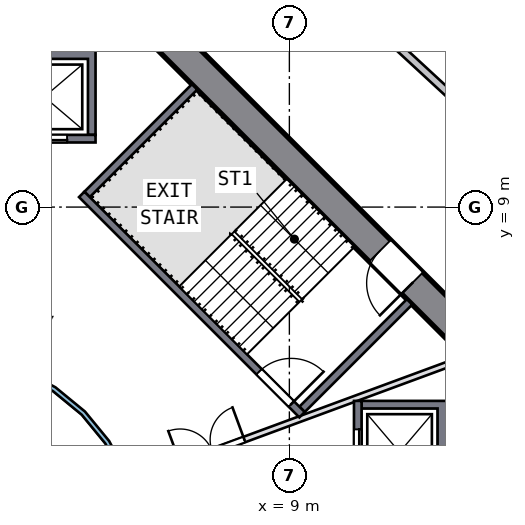
"""IFC4 building model, lengths in metres.
Left out: names, types, materials, properties, quantities, classifications, styles, units other than length and angle.
Written with IfcOpenShell. Run it as: python <this file> out.ifc"""

import sys

from ifc_helpers import new_model, si_unit, direction, frame, frame_2d, origin, place, context, subcontext, project, spatial, polyline, rectangle, outline, extrude, element, fill, save


model = new_model("IFC4")
c1 = context("Model", 3, precision=1e-05, world=origin(), true_north=direction((0.0, 1.0)))
c2 = subcontext(c1, "Body", "Model", "MODEL_VIEW")
j1 = project(units=[si_unit("LENGTHUNIT", "METRE"), si_unit("PLANEANGLEUNIT", "RADIAN")], contexts=[c1])
p1 = place(None, origin())
s1 = spatial("IfcSite", under=j1, at=p1, CompositionType="ELEMENT")
p2 = place(p1, origin())
s2 = spatial("IfcBuilding", under=s1, at=p2, CompositionType="ELEMENT")
p3 = place(p2, frame((0.0, 0.0, 103.5)))
s3 = spatial("IfcBuildingStorey", under=s2, at=p3, CompositionType="ELEMENT", Elevation=103.5)
p4 = place(p3, frame((13.717, 5.516, 0.0), z_axis=(0.0, 0.0, 1.0), x_axis=(-0.707106781, 0.707106781, 0.0)))
e1 = element("IfcWall", 1, at=p4, inside=s3, PredefinedType="SHEAR", context=c2, shape_type="SweptSolid", body=[
    extrude(rectangle(XDim=11.598, YDim=0.8, at=frame_2d((5.799, 0.0))), origin(), (0.0, 0.0, 1.0), 3.5),
])
p5 = place(p4, frame((2.099, 0.0, 0.0)))
e2 = element("IfcOpeningElement", 2, at=p5, cuts=e1, PredefinedType="OPENING", context=c2, shape_type="SweptSolid", body=[
    extrude(rectangle(XDim=1.2, YDim=2.1, at=frame_2d((0.6, 1.05))), frame((0.0, 0.41, 0.0), z_axis=(0.0, -1.0, 0.0), x_axis=(1.0, 0.0, 0.0)), (0.0, 0.0, 1.0), 0.82),
])
p6 = place(p3, origin())
e3 = element("IfcWall", 3, at=p6, inside=s3, PredefinedType="SOLIDWALL", context=c2, shape_type="SweptSolid", body=[
    extrude(outline(polyline([(13.2, 3.9), (13.2, 1.2), (10.9, 1.2), (10.9, 1.4), (12.9, 1.4), (12.9, 3.7), (10.9, 3.7), (10.9, 3.9), (13.2, 3.9)])), origin(), (0.0, 0.0, 1.0), 3.19),
])
p7 = place(p3, frame((10.8, 1.2, 0.0), z_axis=(0.0, 0.0, 1.0), x_axis=(0.0, 1.0, 0.0)))
e4 = element("IfcWall", 4, at=p7, inside=s3, PredefinedType="SOLIDWALL", context=c2, shape_type="SweptSolid", body=[
    extrude(rectangle(XDim=2.7, YDim=0.2, at=frame_2d((1.35, 0.0))), origin(), (0.0, 0.0, 1.0), 3.19),
])
p8 = place(p7, frame((0.75, 0.0, 0.0)))
e5 = element("IfcOpeningElement", 5, at=p8, cuts=e4, PredefinedType="OPENING", context=c2, shape_type="SweptSolid", body=[
    extrude(rectangle(XDim=1.2, YDim=2.1, at=frame_2d((0.6, 1.05))), frame((0.0, 0.11, 0.0), z_axis=(0.0, -1.0, 0.0), x_axis=(1.0, 0.0, 0.0)), (0.0, 0.0, 1.0), 0.22),
])
p9 = place(p3, origin())
e6 = element("IfcWall", 6, at=p9, inside=s3, PredefinedType="SOLIDWALL", context=c2, shape_type="SweptSolid", body=[
    extrude(outline(polyline([(3.9, 13.2), (3.9, 10.9), (3.7, 10.9), (3.7, 12.9), (1.4, 12.9), (1.4, 10.9), (1.2, 10.9), (1.2, 13.2), (3.9, 13.2)])), origin(), (0.0, 0.0, 1.0), 3.19),
])
p10 = place(p3, frame((1.2, 10.8, 0.0), z_axis=(0.0, 0.0, 1.0), x_axis=(1.0, 0.0, 0.0)))
e7 = element("IfcWall", 7, at=p10, inside=s3, PredefinedType="SOLIDWALL", context=c2, shape_type="SweptSolid", body=[
    extrude(rectangle(XDim=2.7, YDim=0.2, at=frame_2d((1.35, 0.0))), origin(), (0.0, 0.0, 1.0), 3.19),
])
p11 = place(p10, frame((0.75, 0.0, 0.0)))
e8 = element("IfcOpeningElement", 8, at=p11, cuts=e7, PredefinedType="OPENING", context=c2, shape_type="SweptSolid", body=[
    extrude(rectangle(XDim=1.2, YDim=2.1, at=frame_2d((0.6, 1.05))), frame((0.0, 0.11, 0.0), z_axis=(0.0, -1.0, 0.0), x_axis=(1.0, 0.0, 0.0)), (0.0, 0.0, 1.0), 0.22),
])
p12 = place(p3, frame((3.535, 9.334, 0.0), z_axis=(0.0, 0.0, 1.0), x_axis=(0.707106781, -0.707106781, 0.0)))
e9 = element("IfcWall", 9, at=p12, inside=s3, PredefinedType="SOLIDWALL", context=c2, shape_type="SweptSolid", body=[
    extrude(rectangle(XDim=8.2, YDim=0.2, at=frame_2d((4.1, 0.0))), origin(), (0.0, 0.0, 1.0), 3.19),
])
p13 = place(p12, frame((6.6, 0.0, 0.0)))
e10 = element("IfcOpeningElement", 10, at=p13, cuts=e9, PredefinedType="OPENING", context=c2, shape_type="SweptSolid", body=[
    extrude(rectangle(XDim=1.2, YDim=2.1, at=frame_2d((0.6, 1.05))), frame((0.0, 0.11, 0.0), z_axis=(0.0, -1.0, 0.0), x_axis=(1.0, 0.0, 0.0)), (0.0, 0.0, 1.0), 0.22),
])
for number, where, z_axis, x_axis in (
    (11, (9.334, 3.677, 0.0), (0.0, 0.0, 1.0), (0.707, 0.707, 0.0)),
    (12, (3.677, 9.334, 0.0), (0.0, 0.0, 1.0), (0.707, 0.707, 0.0)),
):
    element("IfcWall", number, at=place(p3, frame(where, z_axis=z_axis, x_axis=x_axis)), inside=s3, PredefinedType="SOLIDWALL", context=c2, shape_type="SweptSolid", body=[
        extrude(rectangle(XDim=4.0, YDim=0.2, at=frame_2d((2.0, 0.0))), origin(), (0.0, 0.0, 1.0), 3.19),
    ])
p14 = place(p3, frame((4.813, 1.776, 0.0), z_axis=(0.0, 0.0, 1.0), x_axis=(0.938191915, 0.346115488, 0.0)))
e13 = element("IfcWall", 13, at=p14, inside=s3, PredefinedType="PARTITIONING", context=c2, shape_type="SweptSolid", body=[
    extrude(rectangle(XDim=8.91, YDim=0.15, at=frame_2d((4.455, 0.0))), origin(), (0.0, 0.0, 1.0), 3.19),
])
p15 = place(p14, frame((1.4, 0.0, 0.0)))
e14 = element("IfcOpeningElement", 14, at=p15, cuts=e13, PredefinedType="OPENING", context=c2, shape_type="SweptSolid", body=[
    extrude(rectangle(XDim=1.8, YDim=2.1, at=frame_2d((0.9, 1.05))), frame((0.0, 0.085, 0.0), z_axis=(0.0, -1.0, 0.0), x_axis=(1.0, 0.0, 0.0)), (0.0, 0.0, 1.0), 0.17),
])
p16 = place(p3, origin())
e15 = element("IfcWall", 15, at=p16, inside=s3, PredefinedType="SOLIDWALL", context=c2, shape_type="SweptSolid", body=[
    extrude(outline(polyline([(5.021, -0.999), (4.73, -1.959), (4.257, -2.844), (3.62, -3.62), (2.844, -4.257), (1.959, -4.73), (0.999, -5.021), (0.0, -5.12), (-0.999, -5.021), (-1.959, -4.73), (-2.844, -4.257), (-3.62, -3.62), (-4.257, -2.844), (-4.73, -1.959), (-5.021, -0.999), (-5.12, 0.0), (-5.021, 0.999), (-4.73, 1.959), (-4.257, 2.844), (-3.62, 3.62), (-2.844, 4.257), (-1.959, 4.73), (-0.999, 5.021), (0.0, 5.12), (0.999, 5.021), (1.959, 4.73), (2.844, 4.257), (3.62, 3.62), (4.257, 2.844), (4.73, 1.959), (5.021, 0.999), (5.12, 0.0), (5.021, -0.999)]), holes=[polyline([(4.904, 0.976), (4.619, 1.913), (4.157, 2.778), (3.535, 3.535), (2.778, 4.157), (1.913, 4.619), (0.976, 4.904), (0.0, 5.0), (-0.976, 4.904), (-1.913, 4.619), (-2.778, 4.157), (-3.535, 3.535), (-4.157, 2.778), (-4.619, 1.913), (-4.904, 0.976), (-5.0, 0.0), (-4.904, -0.976), (-4.619, -1.913), (-4.157, -2.778), (-3.535, -3.535), (-2.778, -4.157), (-1.913, -4.619), (-0.976, -4.904), (0.0, -5.0), (0.976, -4.904), (1.913, -4.619), (2.778, -4.157), (3.535, -3.535), (4.157, -2.778), (4.619, -1.913), (4.904, -0.976), (5.0, 0.0), (4.904, 0.976)])]), origin(), (0.0, 0.0, 1.0), 3.19),
])
p17 = place(p3, frame((8.699, 16.139, 0.0), z_axis=(0.0, 0.0, 1.0), x_axis=(0.734682268, -0.678411354, 0.0)))
e16 = element("IfcWall", 16, at=p17, inside=s3, PredefinedType="SOLIDWALL", context=c2, shape_type="SweptSolid", body=[
    extrude(rectangle(XDim=9.115, YDim=0.2, at=frame_2d((4.558, 0.0))), origin(), (0.0, 0.0, 1.0), 3.19),
])
p18 = place(p17, frame((0.2, 0.0, 0.0)))
e17 = element("IfcOpeningElement", 17, at=p18, cuts=e16, PredefinedType="OPENING", context=c2, shape_type="SweptSolid", body=[
    extrude(rectangle(XDim=1.0, YDim=2.1, at=frame_2d((0.5, 1.05))), frame((0.0, 0.11, 0.0), z_axis=(0.0, -1.0, 0.0), x_axis=(1.0, 0.0, 0.0)), (0.0, 0.0, 1.0), 0.22),
])
p19 = place(p8, origin())
e18 = element("IfcDoor", 18, at=p19, inside=s3, OperationType="DOUBLE_DOOR_SLIDING", PredefinedType="DOOR", context=c2, shape_type="SweptSolid", body=[
    extrude(rectangle(XDim=1.2, YDim=2.1, at=frame_2d((0.6, 1.05))), frame((0.0, 0.025, 0.0), z_axis=(0.0, -1.0, 0.0), x_axis=(1.0, 0.0, 0.0)), (0.0, 0.0, 1.0), 0.05),
])
fill(e5, e18)
p20 = place(p11, origin())
e19 = element("IfcDoor", 19, at=p20, inside=s3, OperationType="DOUBLE_DOOR_SLIDING", PredefinedType="DOOR", context=c2, shape_type="SweptSolid", body=[
    extrude(rectangle(XDim=1.2, YDim=2.1, at=frame_2d((0.6, 1.05))), frame((0.0, 0.025, 0.0), z_axis=(0.0, -1.0, 0.0), x_axis=(1.0, 0.0, 0.0)), (0.0, 0.0, 1.0), 0.05),
])
fill(e8, e19)
p21 = place(p13, origin())
e20 = element("IfcDoor", 20, at=p21, inside=s3, OperationType="SINGLE_SWING_RIGHT", PredefinedType="DOOR", context=c2, shape_type="SweptSolid", body=[
    extrude(rectangle(XDim=1.2, YDim=2.1, at=frame_2d((0.6, 1.05))), frame((0.0, 0.025, 0.0), z_axis=(0.0, -1.0, 0.0), x_axis=(1.0, 0.0, 0.0)), (0.0, 0.0, 1.0), 0.05),
])
fill(e10, e20)
p22 = place(p5, origin())
e21 = element("IfcDoor", 21, at=p22, inside=s3, OperationType="SINGLE_SWING_LEFT", PredefinedType="DOOR", context=c2, shape_type="SweptSolid", body=[
    extrude(rectangle(XDim=1.2, YDim=2.1, at=frame_2d((0.6, 1.05))), frame((0.0, 0.025, 0.0), z_axis=(0.0, -1.0, 0.0), x_axis=(1.0, 0.0, 0.0)), (0.0, 0.0, 1.0), 0.05),
])
fill(e2, e21)
p23 = place(p15, origin())
e22 = element("IfcDoor", 22, at=p23, inside=s3, OperationType="DOUBLE_DOOR_SINGLE_SWING", PredefinedType="DOOR", context=c2, shape_type="SweptSolid", body=[
    extrude(rectangle(XDim=1.8, YDim=2.1, at=frame_2d((0.9, 1.05))), frame((0.0, 0.025, 0.0), z_axis=(0.0, -1.0, 0.0), x_axis=(1.0, 0.0, 0.0)), (0.0, 0.0, 1.0), 0.05),
])
fill(e14, e22)
save(model, sys.argv[1])
